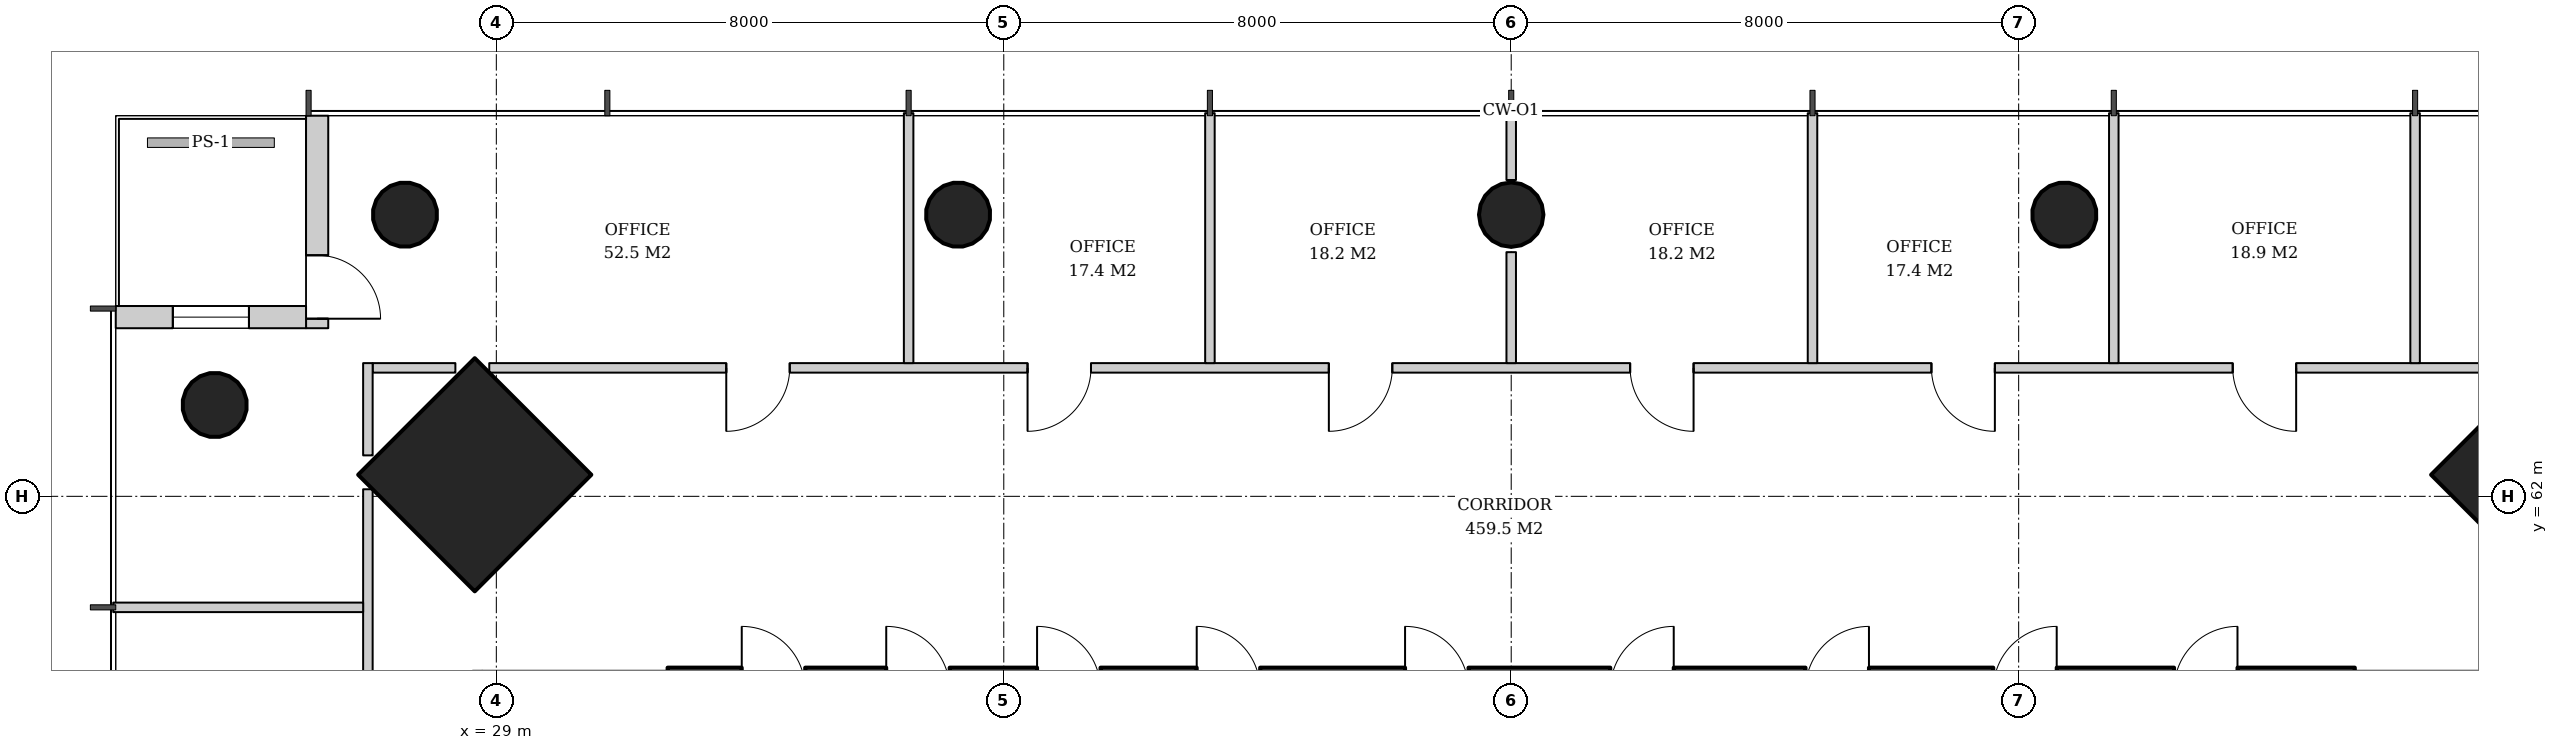
"""IFC4 building model, lengths in metres.
Left out: names, types, materials, properties, quantities, classifications, styles, units other than length and angle.
Written with IfcOpenShell. Run it as: python <this file> out.ifc"""

import sys

from ifc_helpers import new_model, si_unit, direction, frame, frame_2d, origin, origin_2d, place, context, subcontext, project, spatial, rectangle, hollow_circle, extrude, element, fill, save


model = new_model("IFC4")
c1 = context("Model", 3, precision=1e-05, world=origin(), true_north=direction((0.0, 1.0)))
c2 = subcontext(c1, "Body", "Model", "MODEL_VIEW")
j1 = project(units=[si_unit("LENGTHUNIT", "METRE"), si_unit("PLANEANGLEUNIT", "RADIAN")], contexts=[c1])
p1 = place(None, origin())
s1 = spatial("IfcSite", under=j1, at=p1, CompositionType="ELEMENT")
p2 = place(p1, origin())
s2 = spatial("IfcBuilding", under=s1, at=p2, CompositionType="ELEMENT")
p3 = place(p2, frame((0.0, 0.0, 131.2)))
s3 = spatial("IfcBuildingStorey", under=s2, at=p3, CompositionType="ELEMENT", Elevation=131.2)
for number, where, z_axis, x_axis in (
    (1, (61.379, 62.379, 0.0), (-0.032, -0.032, 0.999), (0.707, -0.707, 0.0)),
    (2, (28.621, 62.379, 0.0), (0.032, -0.032, 0.999), (0.707, 0.707, 0.0)),
):
    element("IfcColumn", number, at=place(p3, frame(where, z_axis=z_axis, x_axis=x_axis)), inside=s3, PredefinedType="COLUMN", context=c2, shape_type="SweptSolid", body=[
        extrude(rectangle(XDim=2.6, YDim=2.6, at=origin_2d()), origin(), (0.0, 0.0, 1.0), 3.804),
    ])
p4 = place(p3, frame((27.521, 66.479, 0.0), z_axis=(0.031898107953, -0.031898107953, 0.998981992539), x_axis=(0.707106781187, 0.707106781187, 0.0)))
e3 = element("IfcColumn", 3, at=p4, inside=s3, PredefinedType="COLUMN", context=c2, shape_type="SweptSolid", body=[
    extrude(hollow_circle(Radius=0.508, WallThickness=0.04, at=origin_2d()), origin(), (0.0, 0.0, 1.0), 3.804),
])
p5 = place(p3, frame((53.739, 66.479, 0.0), z_axis=(-0.015987237665, -0.031910269556, 0.999362868496), x_axis=(0.894067115991, -0.447933021895, 0.0)))
e4 = element("IfcColumn", 4, at=p5, inside=s3, PredefinedType="COLUMN", context=c2, shape_type="SweptSolid", body=[
    extrude(hollow_circle(Radius=0.508, WallThickness=0.04, at=origin_2d()), origin(), (0.0, 0.0, 1.0), 3.802),
])
p6 = place(p3, frame((45.0, 66.479, 0.0), z_axis=(0.0, -0.031914348339, 0.999490607445), x_axis=(1.0, 0.0, 0.0)))
e5 = element("IfcColumn", 5, at=p6, inside=s3, PredefinedType="COLUMN", context=c2, shape_type="SweptSolid", body=[
    extrude(hollow_circle(Radius=0.508, WallThickness=0.04, at=origin_2d()), origin(), (0.0, 0.0, 1.0), 3.802),
])
p7 = place(p3, frame((36.261, 66.479, 0.0), z_axis=(0.015987237665, -0.031910269556, 0.999362868496), x_axis=(0.894067115991, 0.447933021895, 0.0)))
e6 = element("IfcColumn", 6, at=p7, inside=s3, PredefinedType="COLUMN", context=c2, shape_type="SweptSolid", body=[
    extrude(hollow_circle(Radius=0.508, WallThickness=0.04, at=origin_2d()), origin(), (0.0, 0.0, 1.0), 3.802),
])
p8 = place(p3, frame((24.521, 63.479, 0.0), z_axis=(0.031898107953, -0.031898107953, 0.998981992539), x_axis=(0.707106781187, 0.707106781187, 0.0)))
e7 = element("IfcColumn", 7, at=p8, inside=s3, PredefinedType="COLUMN", context=c2, shape_type="SweptSolid", body=[
    extrude(hollow_circle(Radius=0.508, WallThickness=0.04, at=origin_2d()), origin(), (0.0, 0.0, 1.0), 3.804),
])
p9 = place(p3, frame((31.7, 58.95, 0.0), z_axis=(0.0, 0.0, 1.0), x_axis=(1.0, 0.0, 0.0)))
e8 = element("IfcWall", 8, at=p9, inside=s3, PredefinedType="SHEAR", context=c2, shape_type="SweptSolid", body=[
    extrude(rectangle(XDim=26.6, YDim=0.7, at=frame_2d((13.3, 0.0))), origin(), (0.0, 0.0, 1.0), 3.8),
])
p10 = place(p9, frame((17.94, 0.0, 0.0)))
e9 = element("IfcOpeningElement", 9, at=p10, cuts=e8, PredefinedType="OPENING", context=c2, shape_type="SweptSolid", body=[
    extrude(rectangle(XDim=1.0, YDim=2.1, at=frame_2d((0.5, 1.05))), frame((0.0, 0.36, 0.0), z_axis=(0.0, -1.0, 0.0), x_axis=(1.0, 0.0, 0.0)), (0.0, 0.0, 1.0), 0.72),
])
p11 = place(p9, frame((5.825, 0.0, 0.0)))
e10 = element("IfcOpeningElement", 10, at=p11, cuts=e8, PredefinedType="OPENING", context=c2, shape_type="SweptSolid", body=[
    extrude(rectangle(XDim=1.0, YDim=2.1, at=frame_2d((0.5, 1.05))), frame((0.0, 0.36, 0.0), z_axis=(0.0, -1.0, 0.0), x_axis=(1.0, 0.0, 0.0)), (0.0, 0.0, 1.0), 0.72),
])
p12 = place(p9, frame((1.169, 0.0, 0.0)))
e11 = element("IfcOpeningElement", 11, at=p12, cuts=e8, PredefinedType="OPENING", context=c2, shape_type="SweptSolid", body=[
    extrude(rectangle(XDim=1.0, YDim=2.1, at=frame_2d((0.5, 1.05))), frame((0.0, 0.36, 0.0), z_axis=(0.0, -1.0, 0.0), x_axis=(1.0, 0.0, 0.0)), (0.0, 0.0, 1.0), 0.72),
])
p13 = place(p9, frame((3.447, 0.0, 0.0)))
e12 = element("IfcOpeningElement", 12, at=p13, cuts=e8, PredefinedType="OPENING", context=c2, shape_type="SweptSolid", body=[
    extrude(rectangle(XDim=1.0, YDim=2.1, at=frame_2d((0.5, 1.05))), frame((0.0, 0.36, 0.0), z_axis=(0.0, -1.0, 0.0), x_axis=(1.0, 0.0, 0.0)), (0.0, 0.0, 1.0), 0.72),
])
p14 = place(p9, frame((8.342, 0.0, 0.0)))
e13 = element("IfcOpeningElement", 13, at=p14, cuts=e8, PredefinedType="OPENING", context=c2, shape_type="SweptSolid", body=[
    extrude(rectangle(XDim=1.0, YDim=2.1, at=frame_2d((0.5, 1.05))), frame((0.0, 0.36, 0.0), z_axis=(0.0, -1.0, 0.0), x_axis=(1.0, 0.0, 0.0)), (0.0, 0.0, 1.0), 0.72),
])
p15 = place(p9, frame((11.626, 0.0, 0.0)))
e14 = element("IfcOpeningElement", 14, at=p15, cuts=e8, PredefinedType="OPENING", context=c2, shape_type="SweptSolid", body=[
    extrude(rectangle(XDim=1.0, YDim=2.1, at=frame_2d((0.5, 1.05))), frame((0.0, 0.36, 0.0), z_axis=(0.0, -1.0, 0.0), x_axis=(1.0, 0.0, 0.0)), (0.0, 0.0, 1.0), 0.72),
])
p16 = place(p9, frame((14.862, 0.0, 0.0)))
e15 = element("IfcOpeningElement", 15, at=p16, cuts=e8, PredefinedType="OPENING", context=c2, shape_type="SweptSolid", body=[
    extrude(rectangle(XDim=1.0, YDim=2.1, at=frame_2d((0.5, 1.05))), frame((0.0, 0.36, 0.0), z_axis=(0.0, -1.0, 0.0), x_axis=(1.0, 0.0, 0.0)), (0.0, 0.0, 1.0), 0.72),
])
p17 = place(p9, frame((20.9, 0.0, 0.0)))
e16 = element("IfcOpeningElement", 16, at=p17, cuts=e8, PredefinedType="OPENING", context=c2, shape_type="SweptSolid", body=[
    extrude(rectangle(XDim=1.0, YDim=2.1, at=frame_2d((0.5, 1.05))), frame((0.0, 0.36, 0.0), z_axis=(0.0, -1.0, 0.0), x_axis=(1.0, 0.0, 0.0)), (0.0, 0.0, 1.0), 0.72),
])
p18 = place(p9, frame((23.75, 0.0, 0.0)))
e17 = element("IfcOpeningElement", 17, at=p18, cuts=e8, PredefinedType="OPENING", context=c2, shape_type="SweptSolid", body=[
    extrude(rectangle(XDim=1.0, YDim=2.1, at=frame_2d((0.5, 1.05))), frame((0.0, 0.36, 0.0), z_axis=(0.0, -1.0, 0.0), x_axis=(1.0, 0.0, 0.0)), (0.0, 0.0, 1.0), 0.72),
])
p19 = place(p3, frame((26.175, 68.0, 0.0), z_axis=(0.0, 0.0, 1.0), x_axis=(0.0, -1.0, 0.0)))
e18 = element("IfcWall", 18, at=p19, inside=s3, PredefinedType="SOLIDWALL", context=c2, shape_type="SweptSolid", body=[
    extrude(rectangle(XDim=3.35, YDim=0.35, at=frame_2d((1.675, 0.0))), origin(), (0.0, 0.0, 1.0), 3.62),
])
p20 = place(p19, frame((2.2, 0.0, 0.0)))
e19 = element("IfcOpeningElement", 19, at=p20, cuts=e18, PredefinedType="OPENING", context=c2, shape_type="SweptSolid", body=[
    extrude(rectangle(XDim=1.0, YDim=2.4, at=frame_2d((0.5, 1.2))), frame((0.0, 0.185, 0.0), z_axis=(0.0, -1.0, 0.0), x_axis=(1.0, 0.0, 0.0)), (0.0, 0.0, 1.0), 0.37),
])
p21 = place(p3, frame((26.0, 64.825, 0.0), z_axis=(0.0, 0.0, 1.0), x_axis=(-1.0, 0.0, 0.0)))
e20 = element("IfcWall", 20, at=p21, inside=s3, PredefinedType="SOLIDWALL", context=c2, shape_type="SweptSolid", body=[
    extrude(rectangle(XDim=3.0, YDim=0.35, at=frame_2d((1.5, 0.0))), origin(), (0.0, 0.0, 1.0), 3.62),
])
p22 = place(p21, frame((0.9, 0.0, 0.6)))
e21 = element("IfcOpeningElement", 21, at=p22, cuts=e20, PredefinedType="OPENING", context=c2, shape_type="SweptSolid", body=[
    extrude(rectangle(XDim=1.2, YDim=2.55, at=frame_2d((0.6, 1.275))), frame((0.0, 0.185, 0.0), z_axis=(0.0, -1.0, 0.0), x_axis=(1.0, 0.0, 0.0)), (0.0, 0.0, 1.0), 0.37),
])
p23 = place(p3, frame((61.112, 64.025, 0.0), z_axis=(0.0, 0.0, 1.0), x_axis=(-1.0, 0.0, 0.0)))
e22 = element("IfcWall", 22, at=p23, inside=s3, PredefinedType="PARTITIONING", context=c2, shape_type="SweptSolid", body=[
    extrude(rectangle(XDim=32.223, YDim=0.15, at=frame_2d((16.112, 0.0))), origin(), (0.0, 0.0, 1.0), 2.72),
])
p24 = place(p23, frame((3.737, 0.0, 0.0)))
e23 = element("IfcOpeningElement", 23, at=p24, cuts=e22, PredefinedType="OPENING", context=c2, shape_type="SweptSolid", body=[
    extrude(rectangle(XDim=1.0, YDim=2.1, at=frame_2d((0.5, 1.05))), frame((0.0, 0.085, 0.0), z_axis=(0.0, -1.0, 0.0), x_axis=(1.0, 0.0, 0.0)), (0.0, 0.0, 1.0), 0.17),
])
p25 = place(p23, frame((8.487, 0.0, 0.0)))
e24 = element("IfcOpeningElement", 24, at=p25, cuts=e22, PredefinedType="OPENING", context=c2, shape_type="SweptSolid", body=[
    extrude(rectangle(XDim=1.0, YDim=2.1, at=frame_2d((0.5, 1.05))), frame((0.0, 0.085, 0.0), z_axis=(0.0, -1.0, 0.0), x_axis=(1.0, 0.0, 0.0)), (0.0, 0.0, 1.0), 0.17),
])
p26 = place(p23, frame((13.237, 0.0, 0.0)))
e25 = element("IfcOpeningElement", 25, at=p26, cuts=e22, PredefinedType="OPENING", context=c2, shape_type="SweptSolid", body=[
    extrude(rectangle(XDim=1.0, YDim=2.1, at=frame_2d((0.5, 1.05))), frame((0.0, 0.085, 0.0), z_axis=(0.0, -1.0, 0.0), x_axis=(1.0, 0.0, 0.0)), (0.0, 0.0, 1.0), 0.17),
])
p27 = place(p23, frame((17.987, 0.0, 0.0)))
e26 = element("IfcOpeningElement", 26, at=p27, cuts=e22, PredefinedType="OPENING", context=c2, shape_type="SweptSolid", body=[
    extrude(rectangle(XDim=1.0, YDim=2.1, at=frame_2d((0.5, 1.05))), frame((0.0, 0.085, 0.0), z_axis=(0.0, -1.0, 0.0), x_axis=(1.0, 0.0, 0.0)), (0.0, 0.0, 1.0), 0.17),
])
p28 = place(p23, frame((22.737, 0.0, 0.0)))
e27 = element("IfcOpeningElement", 27, at=p28, cuts=e22, PredefinedType="OPENING", context=c2, shape_type="SweptSolid", body=[
    extrude(rectangle(XDim=1.0, YDim=2.1, at=frame_2d((0.5, 1.05))), frame((0.0, 0.085, 0.0), z_axis=(0.0, -1.0, 0.0), x_axis=(1.0, 0.0, 0.0)), (0.0, 0.0, 1.0), 0.17),
])
p29 = place(p23, frame((27.487, 0.0, 0.0)))
e28 = element("IfcOpeningElement", 28, at=p29, cuts=e22, PredefinedType="OPENING", context=c2, shape_type="SweptSolid", body=[
    extrude(rectangle(XDim=1.0, YDim=2.1, at=frame_2d((0.5, 1.05))), frame((0.0, 0.085, 0.0), z_axis=(0.0, -1.0, 0.0), x_axis=(1.0, 0.0, 0.0)), (0.0, 0.0, 1.0), 0.17),
])
p30 = place(p3, frame((28.354, 64.025, 0.0), z_axis=(0.0, 0.0, 1.0), x_axis=(-1.0, 0.0, 0.0)))
e29 = element("IfcWall", 29, at=p30, inside=s3, PredefinedType="PARTITIONING", context=c2, shape_type="SweptSolid", body=[
    extrude(rectangle(XDim=1.304, YDim=0.15, at=frame_2d((0.652, 0.0))), origin(), (0.0, 0.0, 1.0), 3.07),
])
for number, where, z_axis, x_axis in (
    (30, (59.25, 64.1, 0.0), (0.0, 0.0, 1.0), (0.0, 1.0, 0.0)),
    (31, (54.5, 64.1, 0.0), (0.0, 0.0, 1.0), (0.0, 1.0, 0.0)),
    (32, (49.75, 64.1, 0.0), (0.0, 0.0, 1.0), (0.0, 1.0, 0.0)),
):
    element("IfcWall", number, at=place(p3, frame(where, z_axis=z_axis, x_axis=x_axis)), inside=s3, PredefinedType="PARTITIONING", context=c2, shape_type="SweptSolid", body=[
        extrude(rectangle(XDim=3.94, YDim=0.15, at=frame_2d((1.97, 0.0))), origin(), (0.0, 0.0, 1.0), 2.82),
    ])
p31 = place(p3, frame((45.0, 64.1, 0.0), z_axis=(0.0, 0.0, 1.0), x_axis=(0.0, 1.0, 0.0)))
e33 = element("IfcWall", 33, at=p31, inside=s3, PredefinedType="PARTITIONING", context=c2, shape_type="SweptSolid", body=[
    extrude(rectangle(XDim=1.749, YDim=0.15, at=frame_2d((0.875, 0.0))), origin(), (0.0, 0.0, 1.0), 3.62),
])
p32 = place(p3, frame((45.0, 66.987, 0.0), z_axis=(0.0, 0.0, 1.0), x_axis=(0.0, 1.0, 0.0)))
e34 = element("IfcWall", 34, at=p32, inside=s3, PredefinedType="PARTITIONING", context=c2, shape_type="SweptSolid", body=[
    extrude(rectangle(XDim=1.053, YDim=0.15, at=frame_2d((0.527, 0.0))), origin(), (0.0, 0.0, 1.0), 3.62),
])
for number, where, z_axis, x_axis in (
    (35, (40.25, 64.1, 0.0), (0.0, 0.0, 1.0), (0.0, 1.0, 0.0)),
    (36, (35.5, 64.1, 0.0), (0.0, 0.0, 1.0), (0.0, 1.0, 0.0)),
):
    element("IfcWall", number, at=place(p3, frame(where, z_axis=z_axis, x_axis=x_axis)), inside=s3, PredefinedType="PARTITIONING", context=c2, shape_type="SweptSolid", body=[
        extrude(rectangle(XDim=3.94, YDim=0.15, at=frame_2d((1.97, 0.0))), origin(), (0.0, 0.0, 1.0), 2.82),
    ])
p33 = place(p3, frame((26.975, 64.1, 0.0), z_axis=(0.0, 0.0, 1.0), x_axis=(0.0, -1.0, 0.0)))
e37 = element("IfcWall", 37, at=p33, inside=s3, PredefinedType="PARTITIONING", context=c2, shape_type="SweptSolid", body=[
    extrude(rectangle(XDim=1.455, YDim=0.15, at=frame_2d((0.727, 0.0))), origin(), (0.0, 0.0, 1.0), 3.07),
])
p34 = place(p3, frame((26.975, 62.112, 0.0), z_axis=(0.0, 0.0, 1.0), x_axis=(0.0, -1.0, 0.0)))
e38 = element("IfcWall", 38, at=p34, inside=s3, PredefinedType="PARTITIONING", context=c2, shape_type="SweptSolid", body=[
    extrude(rectangle(XDim=32.223, YDim=0.15, at=frame_2d((16.112, 0.0))), origin(), (0.0, 0.0, 1.0), 2.72),
])
p35 = place(p34, frame((3.737, 0.0, 0.0)))
e39 = element("IfcOpeningElement", 39, at=p35, cuts=e38, PredefinedType="OPENING", context=c2, shape_type="SweptSolid", body=[
    extrude(rectangle(XDim=1.0, YDim=2.1, at=frame_2d((0.5, 1.05))), frame((0.0, 0.085, 0.0), z_axis=(0.0, -1.0, 0.0), x_axis=(1.0, 0.0, 0.0)), (0.0, 0.0, 1.0), 0.17),
])
p36 = place(p34, frame((8.487, 0.0, 0.0)))
e40 = element("IfcOpeningElement", 40, at=p36, cuts=e38, PredefinedType="OPENING", context=c2, shape_type="SweptSolid", body=[
    extrude(rectangle(XDim=1.0, YDim=2.1, at=frame_2d((0.5, 1.05))), frame((0.0, 0.085, 0.0), z_axis=(0.0, -1.0, 0.0), x_axis=(1.0, 0.0, 0.0)), (0.0, 0.0, 1.0), 0.17),
])
p37 = place(p34, frame((13.237, 0.0, 0.0)))
e41 = element("IfcOpeningElement", 41, at=p37, cuts=e38, PredefinedType="OPENING", context=c2, shape_type="SweptSolid", body=[
    extrude(rectangle(XDim=1.0, YDim=2.1, at=frame_2d((0.5, 1.05))), frame((0.0, 0.085, 0.0), z_axis=(0.0, -1.0, 0.0), x_axis=(1.0, 0.0, 0.0)), (0.0, 0.0, 1.0), 0.17),
])
p38 = place(p34, frame((18.086, 0.0, 0.0)))
e42 = element("IfcOpeningElement", 42, at=p38, cuts=e38, PredefinedType="OPENING", context=c2, shape_type="SweptSolid", body=[
    extrude(rectangle(XDim=0.8, YDim=2.1, at=frame_2d((0.4, 1.05))), frame((0.0, 0.085, 0.0), z_axis=(0.0, -1.0, 0.0), x_axis=(1.0, 0.0, 0.0)), (0.0, 0.0, 1.0), 0.17),
])
p39 = place(p34, frame((22.737, 0.0, 0.0)))
e43 = element("IfcOpeningElement", 43, at=p39, cuts=e38, PredefinedType="OPENING", context=c2, shape_type="SweptSolid", body=[
    extrude(rectangle(XDim=1.0, YDim=2.1, at=frame_2d((0.5, 1.05))), frame((0.0, 0.085, 0.0), z_axis=(0.0, -1.0, 0.0), x_axis=(1.0, 0.0, 0.0)), (0.0, 0.0, 1.0), 0.17),
])
p40 = place(p34, frame((27.586, 0.0, 0.0)))
e44 = element("IfcOpeningElement", 44, at=p40, cuts=e38, PredefinedType="OPENING", context=c2, shape_type="SweptSolid", body=[
    extrude(rectangle(XDim=0.8, YDim=2.1, at=frame_2d((0.4, 1.05))), frame((0.0, 0.085, 0.0), z_axis=(0.0, -1.0, 0.0), x_axis=(1.0, 0.0, 0.0)), (0.0, 0.0, 1.0), 0.17),
])
p41 = place(p3, frame((26.9, 60.25, 0.0), z_axis=(0.0, 0.0, 1.0), x_axis=(-1.0, 0.0, 0.0)))
e45 = element("IfcWall", 45, at=p41, inside=s3, PredefinedType="PARTITIONING", context=c2, shape_type="SweptSolid", body=[
    extrude(rectangle(XDim=3.94, YDim=0.15, at=frame_2d((1.97, 0.0))), origin(), (0.0, 0.0, 1.0), 2.82),
])
p42 = place(p20, origin())
e46 = element("IfcDoor", 46, at=p42, inside=s3, OperationType="SINGLE_SWING_RIGHT", PredefinedType="DOOR", context=c2, shape_type="SweptSolid", body=[
    extrude(rectangle(XDim=1.0, YDim=2.4, at=frame_2d((0.5, 1.2))), frame((0.0, 0.025, 0.0), z_axis=(0.0, -1.0, 0.0), x_axis=(1.0, 0.0, 0.0)), (0.0, 0.0, 1.0), 0.05),
])
fill(e19, e46)
p43 = place(p22, origin())
e47 = element("IfcWindow", 47, at=p43, inside=s3, PartitioningType="SINGLE_PANEL", PredefinedType="WINDOW", context=c2, shape_type="SweptSolid", body=[
    extrude(rectangle(XDim=1.2, YDim=2.55, at=frame_2d((0.6, 1.275))), frame((0.0, 0.03, 0.0), z_axis=(0.0, -1.0, 0.0), x_axis=(1.0, 0.0, 0.0)), (0.0, 0.0, 1.0), 0.06),
])
fill(e21, e47)
p44 = place(p24, origin())
e48 = element("IfcDoor", 48, at=p44, inside=s3, OperationType="SINGLE_SWING_LEFT", PredefinedType="DOOR", context=c2, shape_type="SweptSolid", body=[
    extrude(rectangle(XDim=1.0, YDim=2.1, at=frame_2d((0.5, 1.05))), frame((0.0, 0.025, 0.0), z_axis=(0.0, -1.0, 0.0), x_axis=(1.0, 0.0, 0.0)), (0.0, 0.0, 1.0), 0.05),
])
fill(e23, e48)
p45 = place(p25, origin())
e49 = element("IfcDoor", 49, at=p45, inside=s3, OperationType="SINGLE_SWING_LEFT", PredefinedType="DOOR", context=c2, shape_type="SweptSolid", body=[
    extrude(rectangle(XDim=1.0, YDim=2.1, at=frame_2d((0.5, 1.05))), frame((0.0, 0.025, 0.0), z_axis=(0.0, -1.0, 0.0), x_axis=(1.0, 0.0, 0.0)), (0.0, 0.0, 1.0), 0.05),
])
fill(e24, e49)
p46 = place(p26, origin())
e50 = element("IfcDoor", 50, at=p46, inside=s3, OperationType="SINGLE_SWING_LEFT", PredefinedType="DOOR", context=c2, shape_type="SweptSolid", body=[
    extrude(rectangle(XDim=1.0, YDim=2.1, at=frame_2d((0.5, 1.05))), frame((0.0, 0.025, 0.0), z_axis=(0.0, -1.0, 0.0), x_axis=(1.0, 0.0, 0.0)), (0.0, 0.0, 1.0), 0.05),
])
fill(e25, e50)
p47 = place(p27, origin())
e51 = element("IfcDoor", 51, at=p47, inside=s3, OperationType="SINGLE_SWING_RIGHT", PredefinedType="DOOR", context=c2, shape_type="SweptSolid", body=[
    extrude(rectangle(XDim=1.0, YDim=2.1, at=frame_2d((0.5, 1.05))), frame((0.0, 0.025, 0.0), z_axis=(0.0, -1.0, 0.0), x_axis=(1.0, 0.0, 0.0)), (0.0, 0.0, 1.0), 0.05),
])
fill(e26, e51)
p48 = place(p28, origin())
e52 = element("IfcDoor", 52, at=p48, inside=s3, OperationType="SINGLE_SWING_RIGHT", PredefinedType="DOOR", context=c2, shape_type="SweptSolid", body=[
    extrude(rectangle(XDim=1.0, YDim=2.1, at=frame_2d((0.5, 1.05))), frame((0.0, 0.025, 0.0), z_axis=(0.0, -1.0, 0.0), x_axis=(1.0, 0.0, 0.0)), (0.0, 0.0, 1.0), 0.05),
])
fill(e27, e52)
p49 = place(p29, origin())
e53 = element("IfcDoor", 53, at=p49, inside=s3, OperationType="SINGLE_SWING_RIGHT", PredefinedType="DOOR", context=c2, shape_type="SweptSolid", body=[
    extrude(rectangle(XDim=1.0, YDim=2.1, at=frame_2d((0.5, 1.05))), frame((0.0, 0.025, 0.0), z_axis=(0.0, -1.0, 0.0), x_axis=(1.0, 0.0, 0.0)), (0.0, 0.0, 1.0), 0.05),
])
fill(e28, e53)
save(model, sys.argv[1])
